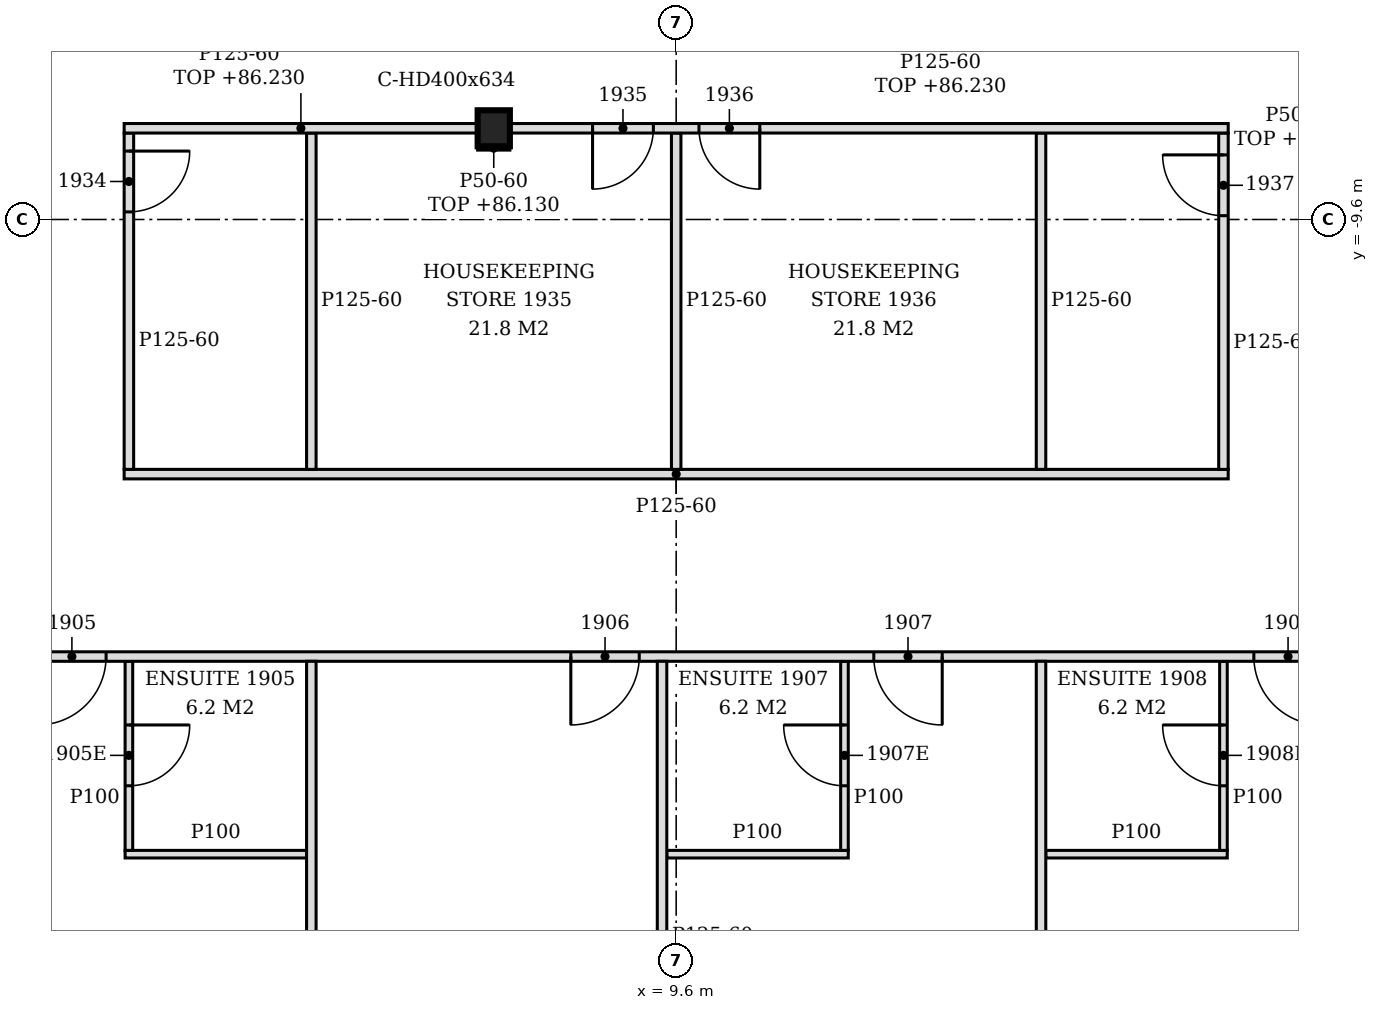
"""IFC4 building model, lengths in metres.
Left out: names, types, materials, properties, quantities, classifications, styles, units other than length and angle.
Written with IfcOpenShell. Run it as: python <this file> out.ifc"""

import sys

from ifc_helpers import new_model, si_unit, direction, frame, frame_2d, origin, origin_2d, place, context, subcontext, project, spatial, polyline, rectangle, i_section, outline, extrude, element, fill, save


model = new_model("IFC4")
c1 = context("Model", 3, precision=1e-05, world=origin(), true_north=direction((0.0, 1.0)))
c2 = subcontext(c1, "Body", "Model", "MODEL_VIEW")
j1 = project(units=[si_unit("LENGTHUNIT", "METRE"), si_unit("PLANEANGLEUNIT", "RADIAN")], contexts=[c1])
p1 = place(None, origin())
s1 = spatial("IfcSite", under=j1, at=p1, CompositionType="ELEMENT")
p2 = place(p1, origin())
s2 = spatial("IfcBuilding", under=s1, at=p2, CompositionType="ELEMENT")
p3 = place(p2, frame((0.0, 0.0, 83.4)))
s3 = spatial("IfcBuildingStorey", under=s2, at=p3, CompositionType="ELEMENT", Elevation=83.4)
p4 = place(p3, frame((7.2, -8.4, -0.15), z_axis=(0.0, 0.0, 1.0), x_axis=(1.0, 0.0, 0.0)))
e1 = element("IfcColumn", 1, at=p4, inside=s3, PredefinedType="COLUMN", context=c2, shape_type="SweptSolid", body=[
    extrude(i_section(OverallWidth=0.424, OverallDepth=0.474, WebThickness=0.048, FlangeThickness=0.077, FilletRadius=0.015, at=origin_2d()), origin(), (0.0, 0.0, 1.0), 3.6),
])
for number, where, z_axis, x_axis in (
    (2, (4.8, -23.65, 0.0), (0.0, 0.0, 1.0), (0.0, 1.0, 0.0)),
    (3, (14.4, -23.65, 0.0), (0.0, 0.0, 1.0), (0.0, 1.0, 0.0)),
):
    element("IfcWall", number, at=place(p3, frame(where, z_axis=z_axis, x_axis=x_axis)), inside=s3, PredefinedType="PARTITIONING", context=c2, shape_type="SweptSolid", body=[
        extrude(outline(polyline([(0.0, 0.0), (8.237, 0.0), (8.238, 3.45), (4.555, 3.45), (4.553, 2.88), (4.345, 2.88), (4.343, 3.45), (0.7, 3.45), (0.698, 2.93), (0.4, 2.93), (0.398, 3.45), (0.0, 3.45), (0.0, 0.0)])), frame((0.0, 0.062, 0.0), z_axis=(0.0, -1.0, 0.0), x_axis=(1.0, 0.0, 0.0)), (0.0, 0.0, 1.0), 0.125),
    ])
p5 = place(p3, frame((9.414, -22.65, 0.0), z_axis=(0.0, 0.0, 1.0), x_axis=(0.0, 1.0, 0.0)))
e4 = element("IfcWall", 4, at=p5, inside=s3, PredefinedType="PARTITIONING", context=c2, shape_type="SweptSolid", body=[
    extrude(outline(polyline([(0.0, 0.0), (7.237, 0.0), (7.238, 3.45), (3.555, 3.45), (3.553, 2.88), (3.345, 2.88), (3.343, 3.45), (0.0, 3.45), (0.0, 0.0)])), frame((0.0, 0.062, 0.0), z_axis=(0.0, -1.0, 0.0), x_axis=(1.0, 0.0, 0.0)), (0.0, 0.0, 1.0), 0.125),
])
p6 = place(p3, frame((2.35, -17.95, 0.0), z_axis=(0.0, 0.0, 1.0), x_axis=(1.0, 0.0, 0.0)))
e5 = element("IfcWall", 5, at=p6, inside=s3, PredefinedType="PARTITIONING", context=c2, shape_type="SweptSolid", body=[
    extrude(rectangle(XDim=2.387, YDim=0.1, at=frame_2d((1.194, 0.0))), origin(), (0.0, 0.0, 1.0), 3.45),
])
p7 = place(p3, frame((2.4, -17.9, 0.0), z_axis=(0.0, 0.0, 1.0), x_axis=(0.0, 1.0, 0.0)))
e6 = element("IfcWall", 6, at=p7, inside=s3, PredefinedType="PARTITIONING", context=c2, shape_type="SweptSolid", body=[
    extrude(rectangle(XDim=2.487, YDim=0.1, at=frame_2d((1.244, 0.0))), origin(), (0.0, 0.0, 1.0), 3.45),
])
p8 = place(p7, frame((0.85, 0.0, 0.0)))
e7 = element("IfcOpeningElement", 7, at=p8, cuts=e6, PredefinedType="OPENING", context=c2, shape_type="SweptSolid", body=[
    extrude(rectangle(XDim=0.8, YDim=2.1, at=frame_2d((0.4, 1.05))), frame((0.0, 0.06, 0.0), z_axis=(0.0, -1.0, 0.0), x_axis=(1.0, 0.0, 0.0)), (0.0, 0.0, 1.0), 0.12),
])
p9 = place(p3, frame((9.477, -17.95, 0.0), z_axis=(0.0, 0.0, 1.0), x_axis=(1.0, 0.0, 0.0)))
e8 = element("IfcWall", 8, at=p9, inside=s3, PredefinedType="PARTITIONING", context=c2, shape_type="SweptSolid", body=[
    extrude(rectangle(XDim=2.387, YDim=0.1, at=frame_2d((1.194, 0.0))), origin(), (0.0, 0.0, 1.0), 3.45),
])
p10 = place(p3, frame((11.814, -17.9, 0.0), z_axis=(0.0, 0.0, 1.0), x_axis=(0.0, 1.0, 0.0)))
e9 = element("IfcWall", 9, at=p10, inside=s3, PredefinedType="PARTITIONING", context=c2, shape_type="SweptSolid", body=[
    extrude(rectangle(XDim=2.487, YDim=0.1, at=frame_2d((1.244, 0.0))), origin(), (0.0, 0.0, 1.0), 3.45),
])
p11 = place(p10, frame((0.85, 0.0, 0.0)))
e10 = element("IfcOpeningElement", 10, at=p11, cuts=e9, PredefinedType="OPENING", context=c2, shape_type="SweptSolid", body=[
    extrude(rectangle(XDim=0.8, YDim=2.1, at=frame_2d((0.4, 1.05))), frame((0.0, 0.06, 0.0), z_axis=(0.0, -1.0, 0.0), x_axis=(1.0, 0.0, 0.0)), (0.0, 0.0, 1.0), 0.12),
])
p12 = place(p3, frame((14.462, -17.95, 0.0), z_axis=(0.0, 0.0, 1.0), x_axis=(1.0, 0.0, 0.0)))
e11 = element("IfcWall", 11, at=p12, inside=s3, PredefinedType="PARTITIONING", context=c2, shape_type="SweptSolid", body=[
    extrude(rectangle(XDim=2.388, YDim=0.1, at=frame_2d((1.194, 0.0))), origin(), (0.0, 0.0, 1.0), 3.45),
])
p13 = place(p3, frame((16.8, -17.9, 0.0), z_axis=(0.0, 0.0, 1.0), x_axis=(0.0, 1.0, 0.0)))
e12 = element("IfcWall", 12, at=p13, inside=s3, PredefinedType="PARTITIONING", context=c2, shape_type="SweptSolid", body=[
    extrude(rectangle(XDim=2.487, YDim=0.1, at=frame_2d((1.244, 0.0))), origin(), (0.0, 0.0, 1.0), 3.45),
])
p14 = place(p13, frame((0.85, 0.0, 0.0)))
e13 = element("IfcOpeningElement", 13, at=p14, cuts=e12, PredefinedType="OPENING", context=c2, shape_type="SweptSolid", body=[
    extrude(rectangle(XDim=0.8, YDim=2.1, at=frame_2d((0.4, 1.05))), frame((0.0, 0.06, 0.0), z_axis=(0.0, -1.0, 0.0), x_axis=(1.0, 0.0, 0.0)), (0.0, 0.0, 1.0), 0.12),
])
p15 = place(p3, frame((-22.75, -15.35, 0.0), z_axis=(0.0, 0.0, 1.0), x_axis=(1.0, 0.0, 0.0)))
e14 = element("IfcWall", 14, at=p15, inside=s3, PredefinedType="PARTITIONING", context=c2, shape_type="SweptSolid", body=[
    extrude(outline(polyline([(0.0, 0.0), (41.887, 0.0), (41.887, 2.73), (41.8, 2.73), (41.798, 3.45), (30.1, 3.45), (30.098, 2.73), (29.8, 2.73), (29.798, 3.45), (18.1, 3.45), (18.098, 2.73), (17.8, 2.73), (17.798, 3.45), (8.5, 3.45), (8.498, 2.93), (8.2, 2.93), (8.198, 3.45), (0.0, 3.45), (0.0, 0.0)])), frame((0.0, 0.062, 0.0), z_axis=(0.0, -1.0, 0.0), x_axis=(1.0, 0.0, 0.0)), (0.0, 0.0, 1.0), 0.125),
])
p16 = place(p15, frame((7.15, 0.0, 0.0)))
e15 = element("IfcOpeningElement", 15, at=p16, cuts=e14, PredefinedType="OPENING", context=c2, shape_type="SweptSolid", body=[
    extrude(rectangle(XDim=0.9, YDim=2.1, at=frame_2d((0.45, 1.05))), frame((0.0, 0.073, 0.0), z_axis=(0.0, -1.0, 0.0), x_axis=(1.0, 0.0, 0.0)), (0.0, 0.0, 1.0), 0.145),
])
p17 = place(p15, frame((9.736, 0.0, 0.0)))
e16 = element("IfcOpeningElement", 16, at=p17, cuts=e14, PredefinedType="OPENING", context=c2, shape_type="SweptSolid", body=[
    extrude(rectangle(XDim=0.9, YDim=2.1, at=frame_2d((0.45, 1.05))), frame((0.0, 0.073, 0.0), z_axis=(0.0, -1.0, 0.0), x_axis=(1.0, 0.0, 0.0)), (0.0, 0.0, 1.0), 0.145),
])
p18 = place(p15, frame((16.75, 0.0, 0.0)))
e17 = element("IfcOpeningElement", 17, at=p18, cuts=e14, PredefinedType="OPENING", context=c2, shape_type="SweptSolid", body=[
    extrude(rectangle(XDim=0.9, YDim=2.1, at=frame_2d((0.45, 1.05))), frame((0.0, 0.073, 0.0), z_axis=(0.0, -1.0, 0.0), x_axis=(1.0, 0.0, 0.0)), (0.0, 0.0, 1.0), 0.145),
])
p19 = place(p15, frame((19.15, 0.0, 0.0)))
e18 = element("IfcOpeningElement", 18, at=p19, cuts=e14, PredefinedType="OPENING", context=c2, shape_type="SweptSolid", body=[
    extrude(rectangle(XDim=0.9, YDim=2.1, at=frame_2d((0.45, 1.05))), frame((0.0, 0.073, 0.0), z_axis=(0.0, -1.0, 0.0), x_axis=(1.0, 0.0, 0.0)), (0.0, 0.0, 1.0), 0.145),
])
p20 = place(p15, frame((23.95, 0.0, 0.0)))
e19 = element("IfcOpeningElement", 19, at=p20, cuts=e14, PredefinedType="OPENING", context=c2, shape_type="SweptSolid", body=[
    extrude(rectangle(XDim=0.9, YDim=2.1, at=frame_2d((0.45, 1.05))), frame((0.0, 0.073, 0.0), z_axis=(0.0, -1.0, 0.0), x_axis=(1.0, 0.0, 0.0)), (0.0, 0.0, 1.0), 0.145),
])
p21 = place(p15, frame((30.964, 0.0, 0.0)))
e20 = element("IfcOpeningElement", 20, at=p21, cuts=e14, PredefinedType="OPENING", context=c2, shape_type="SweptSolid", body=[
    extrude(rectangle(XDim=0.9, YDim=2.1, at=frame_2d((0.45, 1.05))), frame((0.0, 0.073, 0.0), z_axis=(0.0, -1.0, 0.0), x_axis=(1.0, 0.0, 0.0)), (0.0, 0.0, 1.0), 0.145),
])
p22 = place(p15, frame((34.95, 0.0, 0.0)))
e21 = element("IfcOpeningElement", 21, at=p22, cuts=e14, PredefinedType="OPENING", context=c2, shape_type="SweptSolid", body=[
    extrude(rectangle(XDim=0.9, YDim=2.1, at=frame_2d((0.45, 1.05))), frame((0.0, 0.073, 0.0), z_axis=(0.0, -1.0, 0.0), x_axis=(1.0, 0.0, 0.0)), (0.0, 0.0, 1.0), 0.145),
])
p23 = place(p15, frame((39.95, 0.0, 0.0)))
e22 = element("IfcOpeningElement", 22, at=p23, cuts=e14, PredefinedType="OPENING", context=c2, shape_type="SweptSolid", body=[
    extrude(rectangle(XDim=0.9, YDim=2.1, at=frame_2d((0.45, 1.05))), frame((0.0, 0.073, 0.0), z_axis=(0.0, -1.0, 0.0), x_axis=(1.0, 0.0, 0.0)), (0.0, 0.0, 1.0), 0.145),
])
p24 = place(p3, frame((2.337, -12.95, 0.0), z_axis=(0.0, 0.0, 1.0), x_axis=(1.0, 0.0, 0.0)))
e23 = element("IfcWall", 23, at=p24, inside=s3, PredefinedType="PARTITIONING", context=c2, shape_type="SweptSolid", body=[
    extrude(outline(polyline([(0.0, 0.0), (14.525, 0.0), (14.525, 3.45), (5.012, 3.45), (5.01, 2.73), (4.712, 2.73), (4.71, 3.45), (0.0, 3.45), (0.0, 0.0)])), frame((0.0, 0.062, 0.0), z_axis=(0.0, -1.0, 0.0), x_axis=(1.0, 0.0, 0.0)), (0.0, 0.0, 1.0), 0.125),
])
p25 = place(p3, frame((2.4, -12.887, 0.0), z_axis=(0.0, 0.0, 1.0), x_axis=(0.0, 1.0, 0.0)))
e24 = element("IfcWall", 24, at=p25, inside=s3, PredefinedType="PARTITIONING", context=c2, shape_type="SweptSolid", body=[
    extrude(outline(polyline([(0.0, 0.0), (4.425, 0.0), (4.425, 2.83), (4.337, 2.83), (4.335, 3.45), (0.0, 3.45), (0.0, 0.0)])), frame((0.0, 0.062, 0.0), z_axis=(0.0, -1.0, 0.0), x_axis=(1.0, 0.0, 0.0)), (0.0, 0.0, 1.0), 0.125),
])
p26 = place(p25, frame((3.387, 0.0, 0.0)))
e25 = element("IfcOpeningElement", 25, at=p26, cuts=e24, PredefinedType="OPENING", context=c2, shape_type="SweptSolid", body=[
    extrude(rectangle(XDim=0.8, YDim=2.1, at=frame_2d((0.4, 1.05))), frame((0.0, 0.073, 0.0), z_axis=(0.0, -1.0, 0.0), x_axis=(1.0, 0.0, 0.0)), (0.0, 0.0, 1.0), 0.145),
])
for number, where, z_axis, x_axis in (
    (26, (4.8, -12.887, 0.0), (0.0, 0.0, 1.0), (0.0, 1.0, 0.0)),
    (27, (9.6, -12.887, 0.0), (0.0, 0.0, 1.0), (0.0, 1.0, 0.0)),
    (28, (14.4, -12.887, 0.0), (0.0, 0.0, 1.0), (0.0, 1.0, 0.0)),
):
    element("IfcWall", number, at=place(p3, frame(where, z_axis=z_axis, x_axis=x_axis)), inside=s3, PredefinedType="PARTITIONING", context=c2, shape_type="SweptSolid", body=[
        extrude(outline(polyline([(0.0, 0.0), (4.425, 0.0), (4.425, 2.83), (4.337, 2.83), (4.335, 3.45), (0.0, 3.45), (0.0, 0.0)])), frame((0.0, 0.062, 0.0), z_axis=(0.0, -1.0, 0.0), x_axis=(1.0, 0.0, 0.0)), (0.0, 0.0, 1.0), 0.125),
    ])
p27 = place(p3, frame((16.8, -12.887, 0.0), z_axis=(0.0, 0.0, 1.0), x_axis=(0.0, 1.0, 0.0)))
e29 = element("IfcWall", 29, at=p27, inside=s3, PredefinedType="PARTITIONING", context=c2, shape_type="SweptSolid", body=[
    extrude(outline(polyline([(0.0, 0.0), (4.425, 0.0), (4.425, 2.83), (4.337, 2.83), (4.335, 3.45), (0.0, 3.45), (0.0, 0.0)])), frame((0.0, 0.062, 0.0), z_axis=(0.0, -1.0, 0.0), x_axis=(1.0, 0.0, 0.0)), (0.0, 0.0, 1.0), 0.125),
])
p28 = place(p27, frame((3.337, 0.0, 0.0)))
e30 = element("IfcOpeningElement", 30, at=p28, cuts=e29, PredefinedType="OPENING", context=c2, shape_type="SweptSolid", body=[
    extrude(rectangle(XDim=0.8, YDim=2.1, at=frame_2d((0.4, 1.05))), frame((0.0, 0.073, 0.0), z_axis=(0.0, -1.0, 0.0), x_axis=(1.0, 0.0, 0.0)), (0.0, 0.0, 1.0), 0.145),
])
p29 = place(p3, frame((2.337, -8.4, 0.0), z_axis=(0.0, 0.0, 1.0), x_axis=(1.0, 0.0, 0.0)))
e31 = element("IfcWall", 31, at=p29, inside=s3, PredefinedType="PARTITIONING", context=c2, shape_type="SweptSolid", body=[
    extrude(rectangle(XDim=4.651, YDim=0.125, at=frame_2d((2.325, 0.0))), origin(), (0.0, 0.0, 1.0), 2.83),
])
p30 = place(p3, frame((7.412, -8.4, 0.0), z_axis=(0.0, 0.0, 1.0), x_axis=(1.0, 0.0, 0.0)))
e32 = element("IfcWall", 32, at=p30, inside=s3, PredefinedType="PARTITIONING", context=c2, shape_type="SweptSolid", body=[
    extrude(rectangle(XDim=9.45, YDim=0.125, at=frame_2d((4.725, 0.0))), origin(), (0.0, 0.0, 1.0), 2.83),
])
p31 = place(p30, frame((1.088, 0.0, 0.0)))
e33 = element("IfcOpeningElement", 33, at=p31, cuts=e32, PredefinedType="OPENING", context=c2, shape_type="SweptSolid", body=[
    extrude(rectangle(XDim=0.8, YDim=2.1, at=frame_2d((0.4, 1.05))), frame((0.0, 0.073, 0.0), z_axis=(0.0, -1.0, 0.0), x_axis=(1.0, 0.0, 0.0)), (0.0, 0.0, 1.0), 0.145),
])
p32 = place(p30, frame((2.488, 0.0, 0.0)))
e34 = element("IfcOpeningElement", 34, at=p32, cuts=e32, PredefinedType="OPENING", context=c2, shape_type="SweptSolid", body=[
    extrude(rectangle(XDim=0.8, YDim=2.1, at=frame_2d((0.4, 1.05))), frame((0.0, 0.073, 0.0), z_axis=(0.0, -1.0, 0.0), x_axis=(1.0, 0.0, 0.0)), (0.0, 0.0, 1.0), 0.145),
])
p33 = place(p3, frame((6.988, -8.662, 0.0), z_axis=(0.0, 0.0, 1.0), x_axis=(1.0, 0.0, 0.0)))
e35 = element("IfcWall", 35, at=p33, inside=s3, PredefinedType="PARTITIONING", context=c2, shape_type="SweptSolid", body=[
    extrude(rectangle(XDim=0.424, YDim=0.05, at=frame_2d((0.212, 0.0))), origin(), (0.0, 0.0, 1.0), 2.73),
])
p34 = place(p20, frame((0.9, 0.0, 0.0), z_axis=(0.0, 0.0, 1.0), x_axis=(-1.0, 0.0, 0.0)))
e36 = element("IfcDoor", 36, at=p34, inside=s3, OperationType="SINGLE_SWING_RIGHT", PredefinedType="DOOR", context=c2, shape_type="SweptSolid", body=[
    extrude(rectangle(XDim=0.9, YDim=2.1, at=frame_2d((0.45, 1.05))), frame((0.0, 0.025, 0.0), z_axis=(0.0, -1.0, 0.0), x_axis=(1.0, 0.0, 0.0)), (0.0, 0.0, 1.0), 0.05),
])
fill(e19, e36)
p35 = place(p8, frame((0.8, 0.0, 0.0), z_axis=(0.0, 0.0, 1.0), x_axis=(-1.0, 0.0, 0.0)))
e37 = element("IfcDoor", 37, at=p35, inside=s3, OperationType="SINGLE_SWING_LEFT", PredefinedType="DOOR", context=c2, shape_type="SweptSolid", body=[
    extrude(rectangle(XDim=0.8, YDim=2.1, at=frame_2d((0.4, 1.05))), frame((0.0, 0.025, 0.0), z_axis=(0.0, -1.0, 0.0), x_axis=(1.0, 0.0, 0.0)), (0.0, 0.0, 1.0), 0.05),
])
fill(e7, e37)
p36 = place(p21, frame((0.9, 0.0, 0.0), z_axis=(0.0, 0.0, 1.0), x_axis=(-1.0, 0.0, 0.0)))
e38 = element("IfcDoor", 38, at=p36, inside=s3, OperationType="SINGLE_SWING_RIGHT", PredefinedType="DOOR", context=c2, shape_type="SweptSolid", body=[
    extrude(rectangle(XDim=0.9, YDim=2.1, at=frame_2d((0.45, 1.05))), frame((0.0, 0.025, 0.0), z_axis=(0.0, -1.0, 0.0), x_axis=(1.0, 0.0, 0.0)), (0.0, 0.0, 1.0), 0.05),
])
fill(e20, e38)
p37 = place(p22, frame((0.9, 0.0, 0.0), z_axis=(0.0, 0.0, 1.0), x_axis=(-1.0, 0.0, 0.0)))
e39 = element("IfcDoor", 39, at=p37, inside=s3, OperationType="SINGLE_SWING_LEFT", PredefinedType="DOOR", context=c2, shape_type="SweptSolid", body=[
    extrude(rectangle(XDim=0.9, YDim=2.1, at=frame_2d((0.45, 1.05))), frame((0.0, 0.025, 0.0), z_axis=(0.0, -1.0, 0.0), x_axis=(1.0, 0.0, 0.0)), (0.0, 0.0, 1.0), 0.05),
])
fill(e21, e39)
p38 = place(p11, origin())
e40 = element("IfcDoor", 40, at=p38, inside=s3, OperationType="SINGLE_SWING_RIGHT", PredefinedType="DOOR", context=c2, shape_type="SweptSolid", body=[
    extrude(rectangle(XDim=0.8, YDim=2.1, at=frame_2d((0.4, 1.05))), frame((0.0, 0.025, 0.0), z_axis=(0.0, -1.0, 0.0), x_axis=(1.0, 0.0, 0.0)), (0.0, 0.0, 1.0), 0.05),
])
fill(e10, e40)
p39 = place(p23, frame((0.9, 0.0, 0.0), z_axis=(0.0, 0.0, 1.0), x_axis=(-1.0, 0.0, 0.0)))
e41 = element("IfcDoor", 41, at=p39, inside=s3, OperationType="SINGLE_SWING_LEFT", PredefinedType="DOOR", context=c2, shape_type="SweptSolid", body=[
    extrude(rectangle(XDim=0.9, YDim=2.1, at=frame_2d((0.45, 1.05))), frame((0.0, 0.025, 0.0), z_axis=(0.0, -1.0, 0.0), x_axis=(1.0, 0.0, 0.0)), (0.0, 0.0, 1.0), 0.05),
])
fill(e22, e41)
p40 = place(p14, origin())
e42 = element("IfcDoor", 42, at=p40, inside=s3, OperationType="SINGLE_SWING_RIGHT", PredefinedType="DOOR", context=c2, shape_type="SweptSolid", body=[
    extrude(rectangle(XDim=0.8, YDim=2.1, at=frame_2d((0.4, 1.05))), frame((0.0, 0.025, 0.0), z_axis=(0.0, -1.0, 0.0), x_axis=(1.0, 0.0, 0.0)), (0.0, 0.0, 1.0), 0.05),
])
fill(e13, e42)
p41 = place(p26, frame((0.8, 0.0, 0.0), z_axis=(0.0, 0.0, 1.0), x_axis=(-1.0, 0.0, 0.0)))
e43 = element("IfcDoor", 43, at=p41, inside=s3, OperationType="SINGLE_SWING_LEFT", PredefinedType="DOOR", context=c2, shape_type="SweptSolid", body=[
    extrude(rectangle(XDim=0.8, YDim=2.1, at=frame_2d((0.4, 1.05))), frame((0.0, 0.025, 0.0), z_axis=(0.0, -1.0, 0.0), x_axis=(1.0, 0.0, 0.0)), (0.0, 0.0, 1.0), 0.05),
])
fill(e25, e43)
p42 = place(p31, frame((0.8, 0.0, 0.0), z_axis=(0.0, 0.0, 1.0), x_axis=(-1.0, 0.0, 0.0)))
e44 = element("IfcDoor", 44, at=p42, inside=s3, OperationType="SINGLE_SWING_RIGHT", PredefinedType="DOOR", context=c2, shape_type="SweptSolid", body=[
    extrude(rectangle(XDim=0.8, YDim=2.1, at=frame_2d((0.4, 1.05))), frame((0.0, 0.025, 0.0), z_axis=(0.0, -1.0, 0.0), x_axis=(1.0, 0.0, 0.0)), (0.0, 0.0, 1.0), 0.05),
])
fill(e33, e44)
p43 = place(p32, frame((0.8, 0.0, 0.0), z_axis=(0.0, 0.0, 1.0), x_axis=(-1.0, 0.0, 0.0)))
e45 = element("IfcDoor", 45, at=p43, inside=s3, OperationType="SINGLE_SWING_LEFT", PredefinedType="DOOR", context=c2, shape_type="SweptSolid", body=[
    extrude(rectangle(XDim=0.8, YDim=2.1, at=frame_2d((0.4, 1.05))), frame((0.0, 0.025, 0.0), z_axis=(0.0, -1.0, 0.0), x_axis=(1.0, 0.0, 0.0)), (0.0, 0.0, 1.0), 0.05),
])
fill(e34, e45)
p44 = place(p28, origin())
e46 = element("IfcDoor", 46, at=p44, inside=s3, OperationType="SINGLE_SWING_RIGHT", PredefinedType="DOOR", context=c2, shape_type="SweptSolid", body=[
    extrude(rectangle(XDim=0.8, YDim=2.1, at=frame_2d((0.4, 1.05))), frame((0.0, 0.025, 0.0), z_axis=(0.0, -1.0, 0.0), x_axis=(1.0, 0.0, 0.0)), (0.0, 0.0, 1.0), 0.05),
])
fill(e30, e46)
save(model, sys.argv[1])
